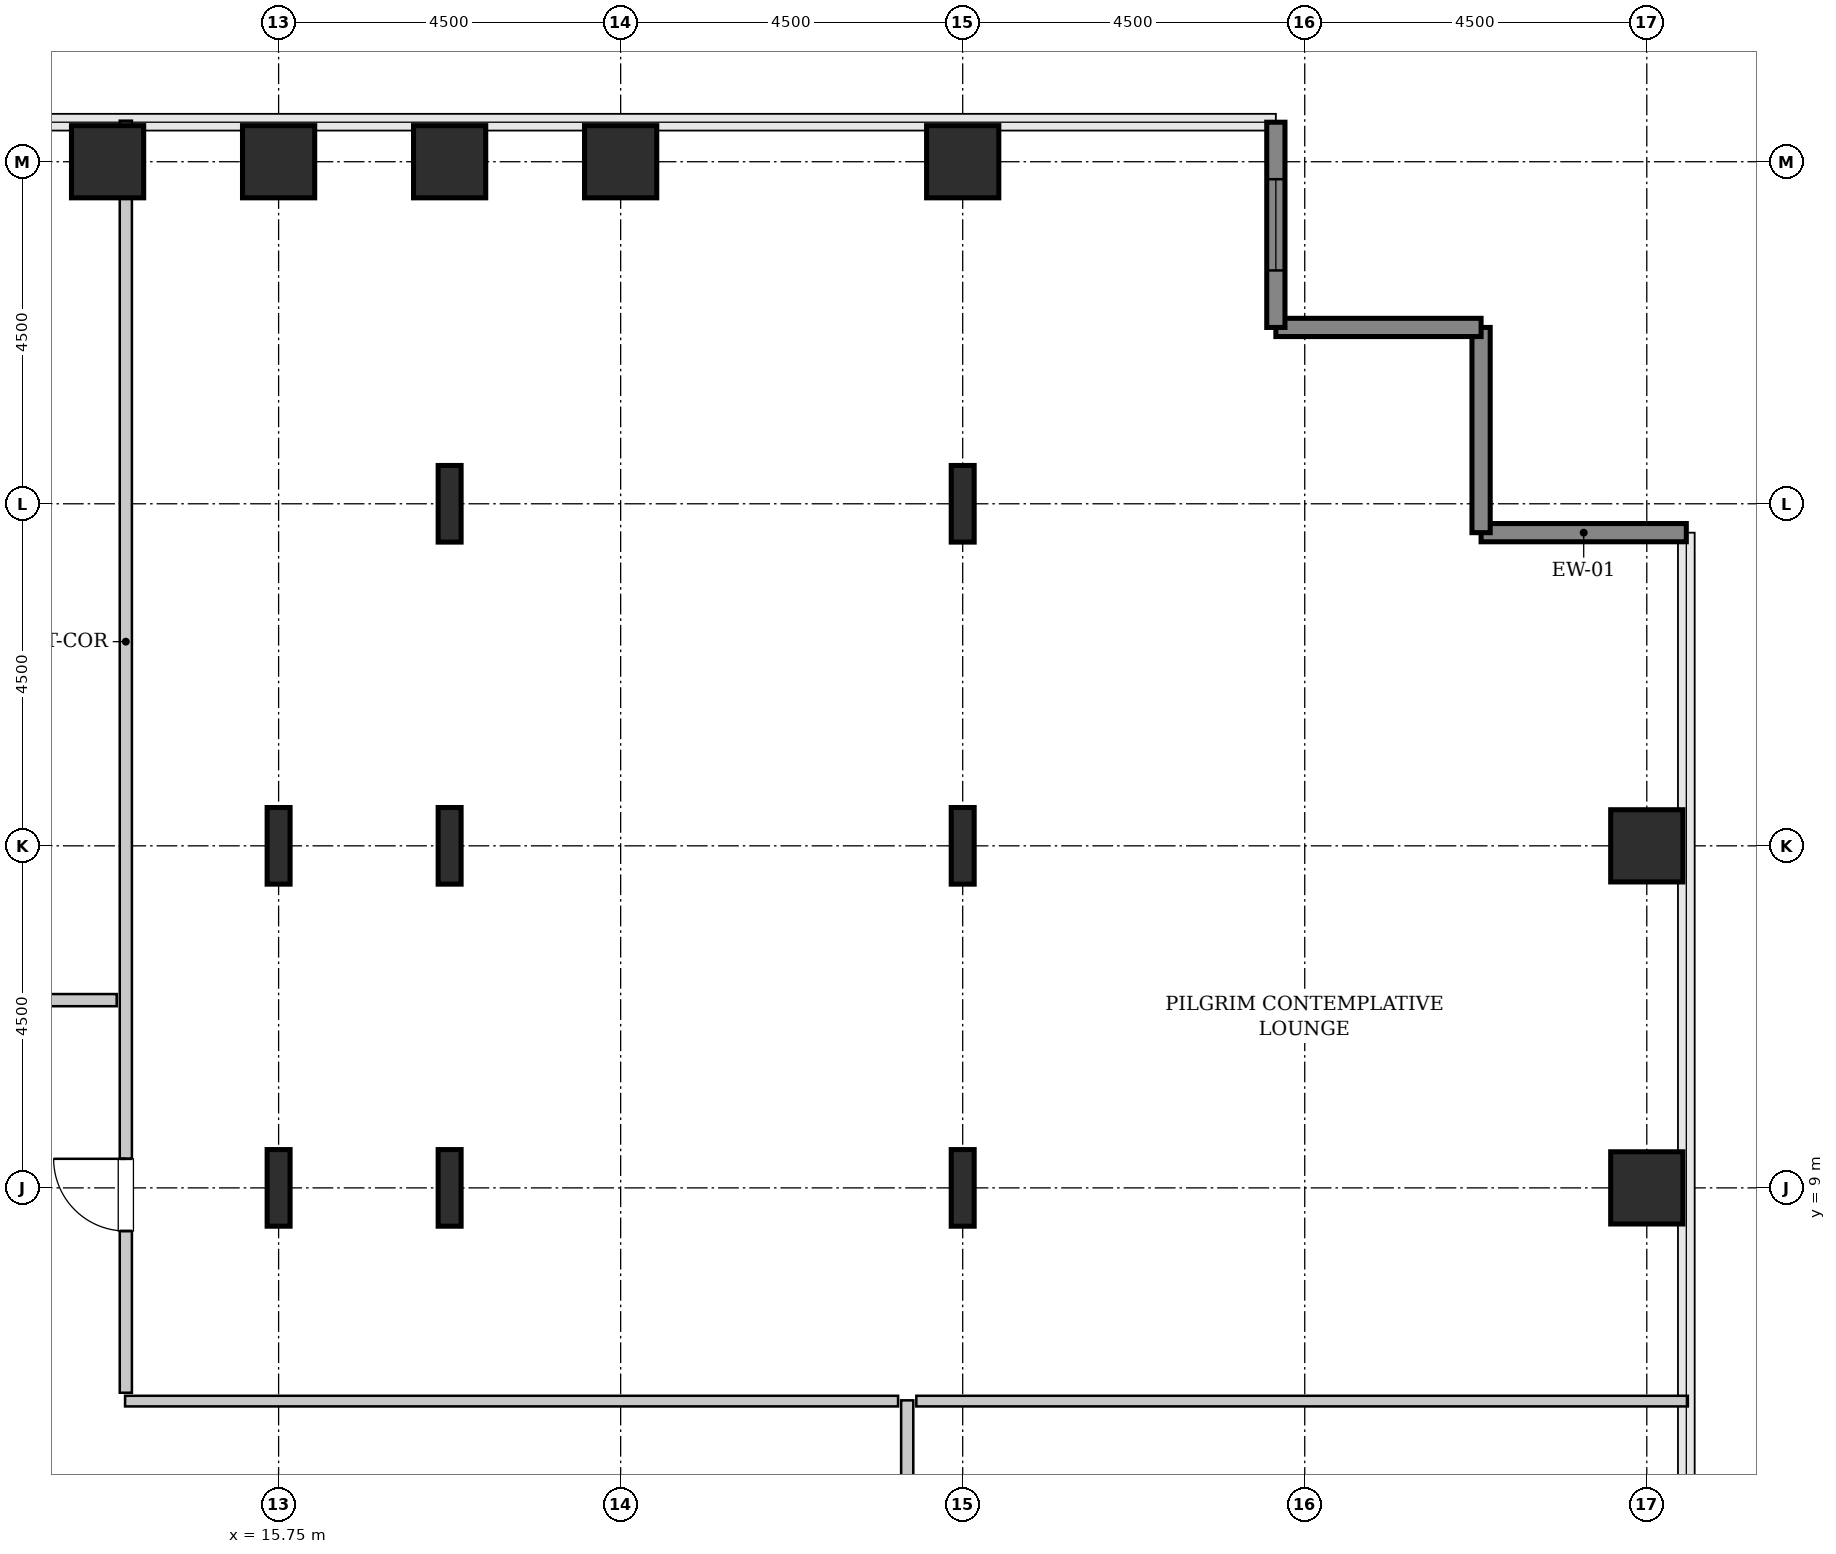
"""IFC4 building model, lengths in metres.
Left out: names, types, materials, properties, quantities, classifications, styles, units other than length and angle.
Written with IfcOpenShell. Run it as: python <this file> out.ifc"""

import sys

from ifc_helpers import new_model, si_unit, direction, frame, frame_2d, origin, origin_2d, place, context, subcontext, project, spatial, rectangle, hollow_rectangle, i_section, extrude, source, transform, mapped, element, fill, save


model = new_model("IFC4")
c1 = context("Model", 3, precision=1e-05, world=origin(), true_north=direction((0.0, 1.0)))
c2 = subcontext(c1, "Body", "Model", "MODEL_VIEW")
j1 = project(units=[si_unit("LENGTHUNIT", "METRE"), si_unit("PLANEANGLEUNIT", "RADIAN")], contexts=[c1])
p1 = place(None, origin())
s1 = spatial("IfcSite", under=j1, at=p1, CompositionType="ELEMENT")
p2 = place(p1, origin())
s2 = spatial("IfcBuilding", under=s1, at=p2, CompositionType="ELEMENT")
p3 = place(p2, frame((0.0, 0.0, 52.0)))
s3 = spatial("IfcBuildingStorey", under=s2, at=p3, CompositionType="ELEMENT", Elevation=52.0)
m1 = source(origin(), c2, "Body", "SweptSolid", [
    extrude(hollow_rectangle(XDim=0.95, YDim=0.95, WallThickness=0.045, InnerFilletRadius=0.045, OuterFilletRadius=0.09, at=origin_2d()), origin(), (0.0, 0.0, 1.0), 3.8),
])
p4 = place(p3, frame((13.5, 22.5, 0.0), z_axis=(0.0, 0.0, 1.0), x_axis=(1.0, 0.0, 0.0)))
e1 = element("IfcColumn", 1, at=p4, inside=s3, PredefinedType="COLUMN", context=c2, shape_type="MappedRepresentation", body=[
    mapped(m1, transform((0.0, 0.0, 0.0), x_axis=(1.0, 0.0, 0.0), y_axis=(0.0, 1.0, 0.0), z_axis=(0.0, 0.0, 1.0), scale=1.0)),
])
m2 = source(origin(), c2, "Body", "SweptSolid", [
    extrude(i_section(OverallWidth=0.302, OverallDepth=1.008, WebThickness=0.021, FlangeThickness=0.04, FilletRadius=0.03, at=origin_2d()), origin(), (0.0, 0.0, 1.0), 3.8),
])
for number, where, z_axis, x_axis in (
    (2, (15.75, 9.0, 0.0), (0.0, 0.0, 1.0), (1.0, 0.0, 0.0)),
    (3, (15.75, 13.5, 0.0), (0.0, 0.0, 1.0), (1.0, 0.0, 0.0)),
):
    element("IfcColumn", number, at=place(p3, frame(where, z_axis=z_axis, x_axis=x_axis)), inside=s3, PredefinedType="COLUMN", context=c2, shape_type="MappedRepresentation", body=[
        mapped(m2, transform((0.0, 0.0, 0.0), x_axis=(1.0, 0.0, 0.0), y_axis=(0.0, 1.0, 0.0), z_axis=(0.0, 0.0, 1.0), scale=1.0)),
    ])
p5 = place(p3, frame((15.75, 22.5, 0.0), z_axis=(0.0, 0.0, 1.0), x_axis=(1.0, 0.0, 0.0)))
e4 = element("IfcColumn", 4, at=p5, inside=s3, PredefinedType="COLUMN", context=c2, shape_type="MappedRepresentation", body=[
    mapped(m1, transform((0.0, 0.0, 0.0), x_axis=(1.0, 0.0, 0.0), y_axis=(0.0, 1.0, 0.0), z_axis=(0.0, 0.0, 1.0), scale=1.0)),
])
for number, where, z_axis, x_axis in (
    (5, (18.0, 9.0, 0.0), (0.0, 0.0, 1.0), (1.0, 0.0, 0.0)),
    (6, (18.0, 13.5, 0.0), (0.0, 0.0, 1.0), (1.0, 0.0, 0.0)),
    (7, (18.0, 18.0, 0.0), (0.0, 0.0, 1.0), (1.0, 0.0, 0.0)),
):
    element("IfcColumn", number, at=place(p3, frame(where, z_axis=z_axis, x_axis=x_axis)), inside=s3, PredefinedType="COLUMN", context=c2, shape_type="MappedRepresentation", body=[
        mapped(m2, transform((0.0, 0.0, 0.0), x_axis=(1.0, 0.0, 0.0), y_axis=(0.0, 1.0, 0.0), z_axis=(0.0, 0.0, 1.0), scale=1.0)),
    ])
for number, where, z_axis, x_axis in (
    (8, (18.0, 22.5, 0.0), (0.0, 0.0, 1.0), (1.0, 0.0, 0.0)),
    (9, (20.25, 22.5, 0.0), (0.0, 0.0, 1.0), (1.0, 0.0, 0.0)),
):
    element("IfcColumn", number, at=place(p3, frame(where, z_axis=z_axis, x_axis=x_axis)), inside=s3, PredefinedType="COLUMN", context=c2, shape_type="MappedRepresentation", body=[
        mapped(m1, transform((0.0, 0.0, 0.0), x_axis=(1.0, 0.0, 0.0), y_axis=(0.0, 1.0, 0.0), z_axis=(0.0, 0.0, 1.0), scale=1.0)),
    ])
for number, where, z_axis, x_axis in (
    (10, (24.75, 9.0, 0.0), (0.0, 0.0, 1.0), (1.0, 0.0, 0.0)),
    (11, (24.75, 13.5, 0.0), (0.0, 0.0, 1.0), (1.0, 0.0, 0.0)),
    (12, (24.75, 18.0, 0.0), (0.0, 0.0, 1.0), (1.0, 0.0, 0.0)),
):
    element("IfcColumn", number, at=place(p3, frame(where, z_axis=z_axis, x_axis=x_axis)), inside=s3, PredefinedType="COLUMN", context=c2, shape_type="MappedRepresentation", body=[
        mapped(m2, transform((0.0, 0.0, 0.0), x_axis=(1.0, 0.0, 0.0), y_axis=(0.0, 1.0, 0.0), z_axis=(0.0, 0.0, 1.0), scale=1.0)),
    ])
for number, where, z_axis, x_axis in (
    (13, (24.75, 22.5, 0.0), (0.0, 0.0, 1.0), (1.0, 0.0, 0.0)),
    (14, (33.75, 9.0, 0.0), (0.0, 0.0, 1.0), (1.0, 0.0, 0.0)),
    (15, (33.75, 13.5, 0.0), (0.0, 0.0, 1.0), (1.0, 0.0, 0.0)),
):
    element("IfcColumn", number, at=place(p3, frame(where, z_axis=z_axis, x_axis=x_axis)), inside=s3, PredefinedType="COLUMN", context=c2, shape_type="MappedRepresentation", body=[
        mapped(m1, transform((0.0, 0.0, 0.0), x_axis=(1.0, 0.0, 0.0), y_axis=(0.0, 1.0, 0.0), z_axis=(0.0, 0.0, 1.0), scale=1.0)),
    ])
m3 = source(origin(), c2, "Body", "SweptSolid", [
    extrude(rectangle(XDim=2.7, YDim=0.24, at=frame_2d((1.35, 0.0))), origin(), (0.0, 0.0, 1.0), 3.55),
])
for number, where, z_axis, x_axis in (
    (16, (34.27, 17.62, 0.0), (0.0, 0.0, 1.0), (-1.0, 0.0, 0.0)),
    (17, (31.57, 17.62, 0.0), (0.0, 0.0, 1.0), (0.0, 1.0, 0.0)),
    (18, (31.57, 20.32, 0.0), (0.0, 0.0, 1.0), (-1.0, 0.0, 0.0)),
):
    element("IfcWall", number, at=place(p3, frame(where, z_axis=z_axis, x_axis=x_axis)), inside=s3, PredefinedType="SHEAR", context=c2, shape_type="MappedRepresentation", body=[
        mapped(m3, transform((0.0, 0.0, 0.0), x_axis=(1.0, 0.0, 0.0), y_axis=(0.0, 1.0, 0.0), z_axis=(0.0, 0.0, 1.0), scale=1.0)),
    ])
p6 = place(p3, frame((28.87, 20.32, 0.0), z_axis=(0.0, 0.0, 1.0), x_axis=(0.0, 1.0, 0.0)))
e19 = element("IfcWall", 19, at=p6, inside=s3, PredefinedType="SHEAR", context=c2, shape_type="MappedRepresentation", body=[
    mapped(m3, transform((0.0, 0.0, 0.0), x_axis=(1.0, 0.0, 0.0), y_axis=(0.0, 1.0, 0.0), z_axis=(0.0, 0.0, 1.0), scale=1.0)),
])
p7 = place(p6, frame((0.75, 0.0, 0.85)))
e20 = element("IfcOpeningElement", 20, at=p7, cuts=e19, PredefinedType="OPENING", context=c2, shape_type="SweptSolid", body=[
    extrude(rectangle(XDim=1.2, YDim=1.8, at=frame_2d((0.6, 0.9))), frame((0.0, 0.13, 0.0), z_axis=(0.0, -1.0, 0.0), x_axis=(1.0, 0.0, 0.0)), (0.0, 0.0, 1.0), 0.26),
])
m4 = source(origin(), c2, "Body", "SweptSolid", [
    extrude(rectangle(XDim=13.3, YDim=0.16, at=frame_2d((6.65, 0.0))), origin(), (0.0, 0.0, 1.0), 3.535),
])
p8 = place(p3, frame((24.02, -7.095, 0.0), z_axis=(0.0, 0.0, 1.0), x_axis=(0.0, 1.0, 0.0)))
e21 = element("IfcWall", 21, at=p8, inside=s3, PredefinedType="PARTITIONING", context=c2, shape_type="MappedRepresentation", body=[
    mapped(m4, transform((0.0, 0.0, 0.0), x_axis=(1.0, 0.0, 0.0), y_axis=(0.0, 1.0, 0.0), z_axis=(0.0, 0.0, 1.0), scale=1.0)),
])
p9 = place(p8, frame((8.87, 0.0, 0.0)))
e22 = element("IfcOpeningElement", 22, at=p9, cuts=e21, PredefinedType="OPENING", context=c2, shape_type="SweptSolid", body=[
    extrude(rectangle(XDim=0.95, YDim=2.1, at=frame_2d((0.475, 1.05))), frame((0.0, 0.09, 0.0), z_axis=(0.0, -1.0, 0.0), x_axis=(1.0, 0.0, 0.0)), (0.0, 0.0, 1.0), 0.18),
])
m5 = source(origin(), c2, "Body", "SweptSolid", [
    extrude(rectangle(XDim=10.17, YDim=0.14, at=frame_2d((5.085, 0.0))), origin(), (0.0, 0.0, 1.0), 3.535),
])
p10 = place(p3, frame((13.73, 6.195, 0.0), z_axis=(0.0, 0.0, 1.0), x_axis=(1.0, 0.0, 0.0)))
e23 = element("IfcWall", 23, at=p10, inside=s3, PredefinedType="PARTITIONING", context=c2, shape_type="MappedRepresentation", body=[
    mapped(m5, transform((0.0, 0.0, 0.0), x_axis=(1.0, 0.0, 0.0), y_axis=(0.0, 1.0, 0.0), z_axis=(0.0, 0.0, 1.0), scale=1.0)),
])
m6 = source(origin(), c2, "Body", "SweptSolid", [
    extrude(rectangle(XDim=10.15, YDim=0.14, at=frame_2d((5.075, 0.0))), origin(), (0.0, 0.0, 1.0), 3.535),
])
p11 = place(p3, frame((24.14, 6.195, 0.0), z_axis=(0.0, 0.0, 1.0), x_axis=(1.0, 0.0, 0.0)))
e24 = element("IfcWall", 24, at=p11, inside=s3, PredefinedType="PARTITIONING", context=c2, shape_type="MappedRepresentation", body=[
    mapped(m6, transform((0.0, 0.0, 0.0), x_axis=(1.0, 0.0, 0.0), y_axis=(0.0, 1.0, 0.0), z_axis=(0.0, 0.0, 1.0), scale=1.0)),
])
m7 = source(origin(), c2, "Body", "SweptSolid", [
    extrude(rectangle(XDim=16.735, YDim=0.16, at=frame_2d((8.368, 0.0))), origin(), (0.0, 0.0, 1.0), 3.535),
])
p12 = place(p3, frame((13.74, 6.305, 0.0), z_axis=(0.0, 0.0, 1.0), x_axis=(0.0, 1.0, 0.0)))
e25 = element("IfcWall", 25, at=p12, inside=s3, PredefinedType="PARTITIONING", context=c2, shape_type="MappedRepresentation", body=[
    mapped(m7, transform((0.0, 0.0, 0.0), x_axis=(1.0, 0.0, 0.0), y_axis=(0.0, 1.0, 0.0), z_axis=(0.0, 0.0, 1.0), scale=1.0)),
])
p13 = place(p12, frame((2.127, 0.0, 0.0)))
e26 = element("IfcOpeningElement", 26, at=p13, cuts=e25, PredefinedType="OPENING", context=c2, shape_type="SweptSolid", body=[
    extrude(rectangle(XDim=0.95, YDim=2.1, at=frame_2d((0.475, 1.05))), frame((0.0, 0.09, 0.0), z_axis=(0.0, -1.0, 0.0), x_axis=(1.0, 0.0, 0.0)), (0.0, 0.0, 1.0), 0.18),
])
m8 = source(origin(), c2, "Body", "SweptSolid", [
    extrude(rectangle(XDim=6.825, YDim=0.16, at=frame_2d((3.413, 0.0))), origin(), (0.0, 0.0, 1.0), 3.535),
])
p14 = place(p3, frame((6.795, 11.47, 0.0), z_axis=(0.0, 0.0, 1.0), x_axis=(1.0, 0.0, 0.0)))
e27 = element("IfcWall", 27, at=p14, inside=s3, PredefinedType="PARTITIONING", context=c2, shape_type="MappedRepresentation", body=[
    mapped(m8, transform((0.0, 0.0, 0.0), x_axis=(1.0, 0.0, 0.0), y_axis=(0.0, 1.0, 0.0), z_axis=(0.0, 0.0, 1.0), scale=1.0)),
])
p15 = place(p14, frame((2.938, 0.0, 0.0)))
e28 = element("IfcOpeningElement", 28, at=p15, cuts=e27, PredefinedType="OPENING", context=c2, shape_type="SweptSolid", body=[
    extrude(rectangle(XDim=0.95, YDim=2.1, at=frame_2d((0.475, 1.05))), frame((0.0, 0.09, 0.0), z_axis=(0.0, -1.0, 0.0), x_axis=(1.0, 0.0, 0.0)), (0.0, 0.0, 1.0), 0.18),
])
m9 = source(origin(), c2, "Body", "SweptSolid", [
    extrude(rectangle(XDim=1.2, YDim=1.8, at=frame_2d((0.6, 0.9))), frame((0.0, 0.03, 0.0), z_axis=(0.0, -1.0, 0.0), x_axis=(1.0, 0.0, 0.0)), (0.0, 0.0, 1.0), 0.06),
])
p16 = place(p7, origin())
e29 = element("IfcWindow", 29, at=p16, inside=s3, PartitioningType="SINGLE_PANEL", PredefinedType="WINDOW", context=c2, shape_type="MappedRepresentation", body=[
    mapped(m9, transform((0.0, 0.0, 0.0), x_axis=(1.0, 0.0, 0.0), y_axis=(0.0, 1.0, 0.0), z_axis=(0.0, 0.0, 1.0), scale=1.0)),
])
fill(e20, e29)
m10 = source(origin(), c2, "Body", "SweptSolid", [
    extrude(rectangle(XDim=0.95, YDim=2.1, at=frame_2d((0.475, 1.05))), frame((0.0, 0.025, 0.0), z_axis=(0.0, -1.0, 0.0), x_axis=(1.0, 0.0, 0.0)), (0.0, 0.0, 1.0), 0.05),
])
p17 = place(p13, origin())
e30 = element("IfcDoor", 30, at=p17, inside=s3, OperationType="SINGLE_SWING_RIGHT", PredefinedType="DOOR", context=c2, shape_type="MappedRepresentation", body=[
    mapped(m10, transform((0.0, 0.0, 0.0), x_axis=(1.0, 0.0, 0.0), y_axis=(0.0, 1.0, 0.0), z_axis=(0.0, 0.0, 1.0), scale=1.0)),
])
fill(e26, e30)
save(model, sys.argv[1])
